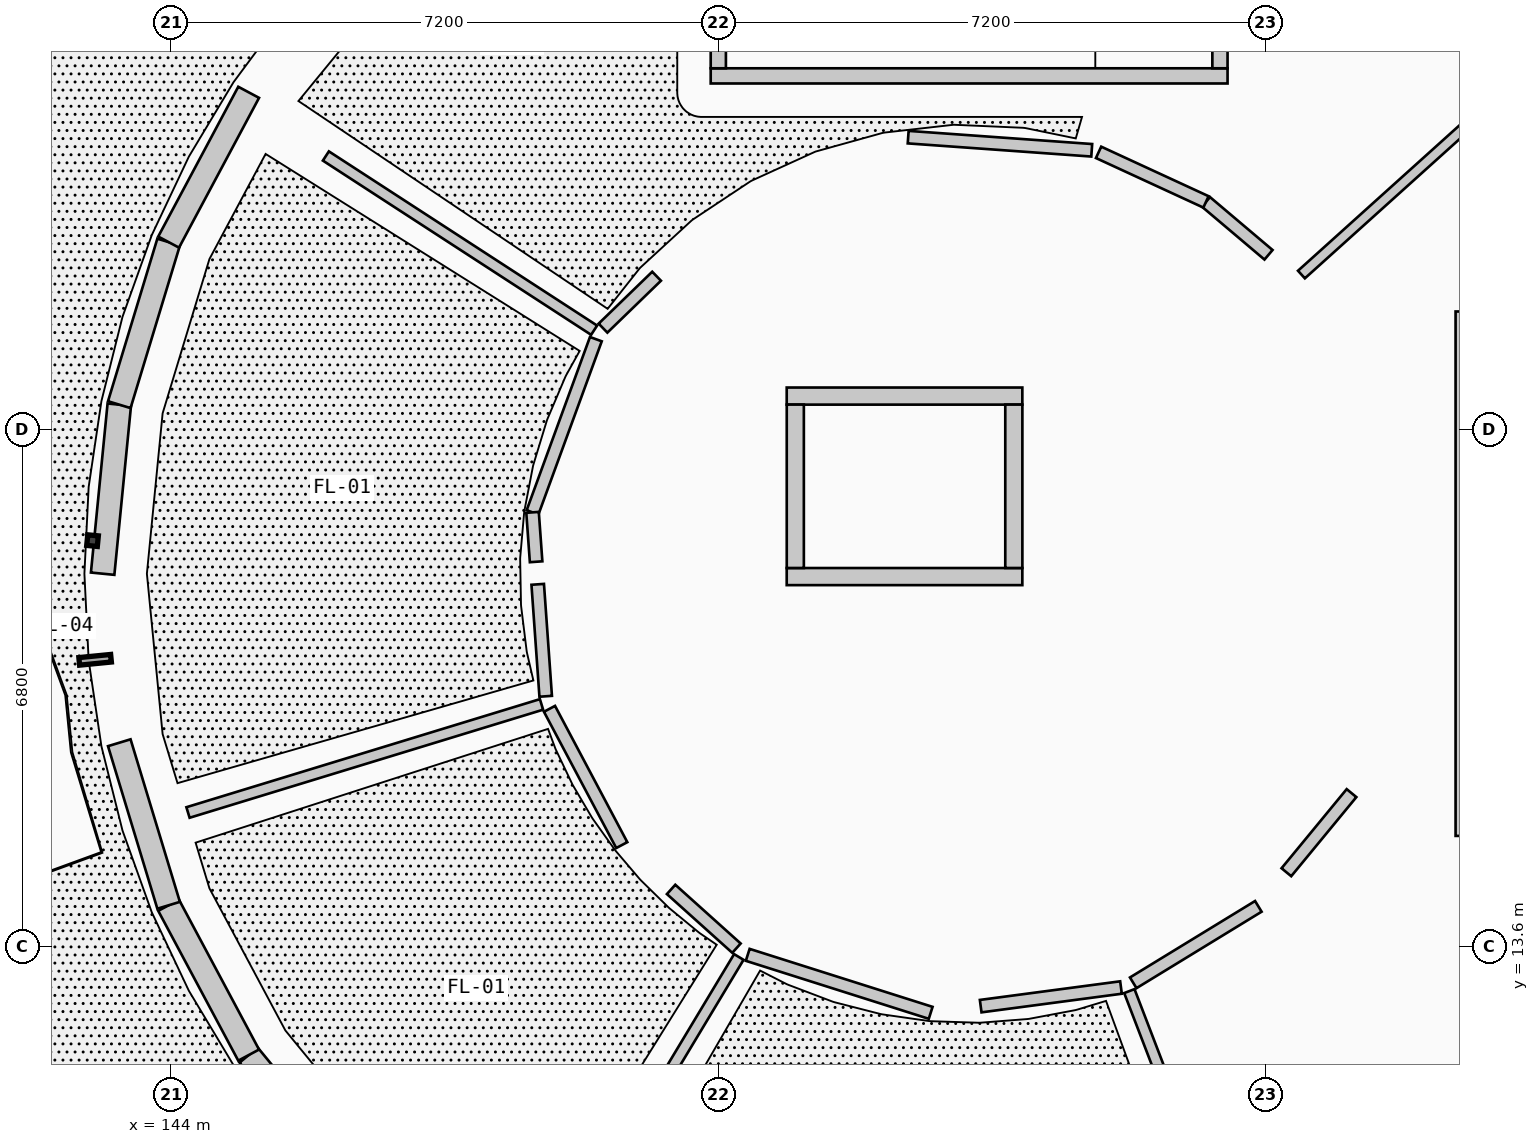
"""IFC4 building model, lengths in metres.
Left out: names, types, materials, properties, quantities, classifications, styles, units other than length and angle.
Written with IfcOpenShell. Run it as: python <this file> out.ifc"""

import sys

from ifc_helpers import new_model, si_unit, direction, frame, frame_2d, origin, origin_2d, place, context, subcontext, project, spatial, rectangle, circle, extrude, element, fill, save


model = new_model("IFC4")
c1 = context("Model", 3, precision=1e-05, world=origin(), true_north=direction((0.0, 1.0)))
c2 = subcontext(c1, "Body", "Model", "MODEL_VIEW")
j1 = project(units=[si_unit("LENGTHUNIT", "METRE"), si_unit("PLANEANGLEUNIT", "RADIAN")], contexts=[c1])
p1 = place(None, origin())
s1 = spatial("IfcSite", under=j1, at=p1, CompositionType="ELEMENT")
p2 = place(p1, origin())
s2 = spatial("IfcBuilding", under=s1, at=p2, CompositionType="ELEMENT")
p3 = place(p2, origin())
s3 = spatial("IfcBuildingStorey", under=s2, at=p3, CompositionType="ELEMENT", Elevation=0.0)
for number, where, z_axis, x_axis in (
    (1, (144.448, 22.664, 0.0), (0.0, 0.0, 1.0), (1.0, 0.0, 0.0)),
    (2, (143.62, 18.5, 0.0), (0.0, 0.0, 1.0), (1.0, 0.0, 0.0)),
    (3, (144.448, 14.336, 0.0), (0.0, 0.0, 1.0), (1.0, 0.0, 0.0)),
):
    element("IfcColumn", number, at=place(p3, frame(where, z_axis=z_axis, x_axis=x_axis)), inside=s3, PredefinedType="PILASTER", context=c2, shape_type="SweptSolid", body=[
        extrude(circle(Radius=0.275, at=origin_2d()), origin(), (0.0, 0.0, 1.0), 4.55),
    ])
for number, where, z_axis, x_axis in (
    (4, (158.601, 22.601, 0.0), (0.0, 0.0, 1.0), (1.0, 0.0, 0.0)),
    (5, (150.399, 22.601, 0.0), (0.0, 0.0, 1.0), (1.0, 0.0, 0.0)),
    (6, (148.7, 18.5, 0.0), (0.0, 0.0, 1.0), (1.0, 0.0, 0.0)),
    (7, (150.399, 14.399, 0.0), (0.0, 0.0, 1.0), (1.0, 0.0, 0.0)),
    (8, (154.5, 12.7, 0.0), (0.0, 0.0, 1.0), (1.0, 0.0, 0.0)),
    (9, (158.601, 14.399, 0.0), (0.0, 0.0, 1.0), (1.0, 0.0, 0.0)),
):
    element("IfcColumn", number, at=place(p3, frame(where, z_axis=z_axis, x_axis=x_axis)), inside=s3, PredefinedType="COLUMN", context=c2, shape_type="SweptSolid", body=[
        extrude(rectangle(XDim=0.365, YDim=0.365, at=origin_2d()), origin(), (0.0, 0.0, 1.0), 4.55),
    ])
p4 = place(p3, frame((143.129, 15.068, 0.0), z_axis=(0.0, 0.0, 1.0), x_axis=(1.0, 0.0, 0.0)))
e10 = element("IfcColumn", 10, at=p4, inside=s3, PredefinedType="PILASTER", context=c2, shape_type="SweptSolid", body=[
    extrude(circle(Radius=0.275, at=origin_2d()), origin(), (0.0, 0.0, 1.0), 4.55),
])
for number, where, z_axis, x_axis in (
    (11, (146.439, 10.439, 0.0), (0.0, 0.0, 1.0), (-0.635, 0.773, 0.0)),
    (12, (145.021, 12.166, 0.0), (0.0, 0.0, 1.0), (-0.471, 0.882, 0.0)),
):
    element("IfcWall", number, at=place(p3, frame(where, z_axis=z_axis, x_axis=x_axis)), inside=s3, PredefinedType="SOLIDWALL", context=c2, shape_type="SweptSolid", body=[
        extrude(rectangle(XDim=2.235, YDim=0.31, at=frame_2d((1.117, 0.0))), origin(), (0.0, 0.0, 1.0), 3.659),
    ])
p5 = place(p3, frame((143.968, 14.137, 0.0), z_axis=(0.0, 0.0, 1.0), x_axis=(-0.290322655883, 0.956928814218, 0.0)))
e13 = element("IfcWall", 13, at=p5, inside=s3, PredefinedType="SOLIDWALL", context=c2, shape_type="SweptSolid", body=[
    extrude(rectangle(XDim=2.235, YDim=0.31, at=frame_2d((1.118, 0.0))), origin(), (0.0, 0.0, 1.0), 3.659),
])
p6 = place(p3, frame((143.1, 18.5, 0.0), z_axis=(0.0, 0.0, 1.0), x_axis=(0.097989369151, 0.995187461503, 0.0)))
e14 = element("IfcWall", 14, at=p6, inside=s3, PredefinedType="SOLIDWALL", context=c2, shape_type="SweptSolid", body=[
    extrude(rectangle(XDim=2.235, YDim=0.31, at=frame_2d((1.117, 0.0))), origin(), (0.0, 0.0, 1.0), 3.659),
])
p7 = place(p3, frame((143.319, 20.724, 0.0), z_axis=(0.0, 0.0, 1.0), x_axis=(0.290322655883, 0.956928814218, 0.0)))
e15 = element("IfcWall", 15, at=p7, inside=s3, PredefinedType="SOLIDWALL", context=c2, shape_type="SweptSolid", body=[
    extrude(rectangle(XDim=2.235, YDim=0.31, at=frame_2d((1.118, 0.0))), origin(), (0.0, 0.0, 1.0), 3.659),
])
p8 = place(p3, frame((143.968, 22.863, 0.0), z_axis=(0.0, 0.0, 1.0), x_axis=(0.471217561446, 0.882017012185, 0.0)))
e16 = element("IfcWall", 16, at=p8, inside=s3, PredefinedType="SOLIDWALL", context=c2, shape_type="SweptSolid", body=[
    extrude(rectangle(XDim=2.235, YDim=0.31, at=frame_2d((1.117, 0.0))), origin(), (0.0, 0.0, 1.0), 3.659),
])
p9 = place(p8, frame((0.417, 0.0, 0.0)))
e17 = element("IfcOpeningElement", 17, at=p9, cuts=e16, PredefinedType="OPENING", context=c2, shape_type="SweptSolid", body=[
    extrude(rectangle(XDim=1.4, YDim=2.3, at=frame_2d((0.7, 1.15))), frame((0.0, 0.165, 0.0), z_axis=(0.0, -1.0, 0.0), x_axis=(1.0, 0.0, 0.0)), (0.0, 0.0, 1.0), 0.33),
])
p10 = place(p3, frame((161.025, 21.95, 0.0), z_axis=(0.0, 0.0, 1.0), x_axis=(0.0, -1.0, 0.0)))
e18 = element("IfcWall", 18, at=p10, inside=s3, PredefinedType="SHEAR", context=c2, shape_type="SweptSolid", body=[
    extrude(rectangle(XDim=6.9, YDim=0.25, at=frame_2d((3.45, 0.0))), origin(), (0.0, 0.0, 1.0), 4.305),
])
p11 = place(p10, frame((0.43, 0.0, 0.0)))
e19 = element("IfcOpeningElement", 19, at=p11, cuts=e18, PredefinedType="OPENING", context=c2, shape_type="SweptSolid", body=[
    extrude(rectangle(XDim=1.1, YDim=2.15, at=frame_2d((0.55, 1.075))), frame((0.0, 0.135, 0.0), z_axis=(0.0, -1.0, 0.0), x_axis=(1.0, 0.0, 0.0)), (0.0, 0.0, 1.0), 0.27),
])
p12 = place(p3, frame((151.1, 25.05, 0.0), z_axis=(0.0, 0.0, 1.0), x_axis=(1.0, 0.0, 0.0)))
e20 = element("IfcWall", 20, at=p12, inside=s3, PredefinedType="SHEAR", context=c2, shape_type="SweptSolid", body=[
    extrude(rectangle(XDim=6.8, YDim=0.2, at=frame_2d((3.4, 0.0))), origin(), (0.0, 0.0, 1.0), 4.305),
])
p13 = place(p12, frame((0.38, 0.0, 0.0)))
e21 = element("IfcOpeningElement", 21, at=p13, cuts=e20, PredefinedType="OPENING", context=c2, shape_type="SweptSolid", body=[
    extrude(rectangle(XDim=1.05, YDim=2.15, at=frame_2d((0.525, 1.075))), frame((0.0, 0.11, 0.0), z_axis=(0.0, -1.0, 0.0), x_axis=(1.0, 0.0, 0.0)), (0.0, 0.0, 1.0), 0.22),
])
for number, where, z_axis, x_axis in (
    (22, (151.2, 25.15, 0.0), (0.0, 0.0, 1.0), (0.0, 1.0, 0.0)),
    (23, (157.8, 25.15, 0.0), (0.0, 0.0, 1.0), (0.0, 1.0, 0.0)),
):
    element("IfcWall", number, at=place(p3, frame(where, z_axis=z_axis, x_axis=x_axis)), inside=s3, PredefinedType="SHEAR", context=c2, shape_type="SweptSolid", body=[
        extrude(rectangle(XDim=2.9, YDim=0.2, at=frame_2d((1.45, 0.0))), origin(), (0.0, 0.0, 1.0), 4.305),
    ])
p14 = place(p3, frame((152.1, 18.462, 0.0), z_axis=(0.0, 0.0, 1.0), x_axis=(1.0, 0.0, 0.0)))
e24 = element("IfcWall", 24, at=p14, inside=s3, PredefinedType="SHEAR", context=c2, shape_type="SweptSolid", body=[
    extrude(rectangle(XDim=3.1, YDim=0.225, at=frame_2d((1.55, 0.0))), origin(), (0.0, 0.0, 1.0), 4.305),
])
p15 = place(p14, frame((0.95, 0.0, 0.0)))
e25 = element("IfcOpeningElement", 25, at=p15, cuts=e24, PredefinedType="OPENING", context=c2, shape_type="SweptSolid", body=[
    extrude(rectangle(XDim=1.2, YDim=2.2, at=frame_2d((0.6, 1.1))), frame((0.0, 0.123, 0.0), z_axis=(0.0, -1.0, 0.0), x_axis=(1.0, 0.0, 0.0)), (0.0, 0.0, 1.0), 0.245),
])
p16 = place(p3, frame((152.1, 20.837, 0.0), z_axis=(0.0, 0.0, 1.0), x_axis=(1.0, 0.0, 0.0)))
e26 = element("IfcWall", 26, at=p16, inside=s3, PredefinedType="SHEAR", context=c2, shape_type="SweptSolid", body=[
    extrude(rectangle(XDim=3.1, YDim=0.225, at=frame_2d((1.55, 0.0))), origin(), (0.0, 0.0, 1.0), 4.305),
])
for number, where, z_axis, x_axis in (
    (27, (152.213, 18.575, 0.0), (0.0, 0.0, 1.0), (0.0, 1.0, 0.0)),
    (28, (155.088, 18.575, 0.0), (0.0, 0.0, 1.0), (0.0, 1.0, 0.0)),
):
    element("IfcWall", number, at=place(p3, frame(where, z_axis=z_axis, x_axis=x_axis)), inside=s3, PredefinedType="SHEAR", context=c2, shape_type="SweptSolid", body=[
        extrude(rectangle(XDim=2.15, YDim=0.225, at=frame_2d((1.075, 0.0))), origin(), (0.0, 0.0, 1.0), 4.305),
    ])
p17 = place(p3, frame((149.566, 21.704, 0.0), z_axis=(0.0, 0.0, 1.0), x_axis=(-0.838631802298, 0.544698724227, 0.0)))
e29 = element("IfcWall", 29, at=p17, inside=s3, PredefinedType="PARTITIONING", context=c2, shape_type="SweptSolid", body=[
    extrude(rectangle(XDim=4.208, YDim=0.145, at=frame_2d((2.104, 0.0))), origin(), (0.0, 0.0, 1.0), 3.634),
])
p18 = place(p3, frame((148.874, 16.78, 0.0), z_axis=(0.0, 0.0, 1.0), x_axis=(-0.956297390361, -0.292395795436, 0.0)))
e30 = element("IfcWall", 30, at=p18, inside=s3, PredefinedType="PARTITIONING", context=c2, shape_type="SweptSolid", body=[
    extrude(rectangle(XDim=4.864, YDim=0.145, at=frame_2d((2.432, 0.0))), origin(), (0.0, 0.0, 1.0), 3.634),
])
p19 = place(p3, frame((151.47, 13.457, 0.0), z_axis=(0.0, 0.0, 1.0), x_axis=(-0.515033199945, -0.857170229858, 0.0)))
e31 = element("IfcWall", 31, at=p19, inside=s3, PredefinedType="PARTITIONING", context=c2, shape_type="SweptSolid", body=[
    extrude(rectangle(XDim=4.007, YDim=0.145, at=frame_2d((2.004, 0.0))), origin(), (0.0, 0.0, 1.0), 3.634),
])
p20 = place(p3, frame((156.608, 13.008, 0.0), z_axis=(0.0, 0.0, 1.0), x_axis=(0.358370363431, -0.93357949989, 0.0)))
e32 = element("IfcWall", 32, at=p20, inside=s3, PredefinedType="PARTITIONING", context=c2, shape_type="SweptSolid", body=[
    extrude(rectangle(XDim=4.892, YDim=0.145, at=frame_2d((2.446, 0.0))), origin(), (0.0, 0.0, 1.0), 3.634),
])
p21 = place(p3, frame((158.872, 22.436, 0.0), z_axis=(0.0, 0.0, 1.0), x_axis=(0.743070024966, 0.669213671406, 0.0)))
e33 = element("IfcWall", 33, at=p21, inside=s3, PredefinedType="PLUMBINGWALL", context=c2, shape_type="SweptSolid", body=[
    extrude(rectangle(XDim=4.876, YDim=0.135, at=frame_2d((2.438, 0.0))), origin(), (0.0, 0.0, 1.0), 3.634),
])
p22 = place(p3, frame((156.113, 24.071, 0.0), z_axis=(0.0, 0.0, 1.0), x_axis=(-0.997448452595, 0.071390366401, 0.0)))
e34 = element("IfcWall", 34, at=p22, inside=s3, PredefinedType="PARTITIONING", context=c2, shape_type="SweptSolid", body=[
    extrude(rectangle(XDim=2.421, YDim=0.165, at=frame_2d((1.21, 0.0))), origin(), (0.0, 0.0, 1.0), 3.634),
])
p23 = place(p3, frame((150.388, 22.414, 0.0), z_axis=(0.0, 0.0, 1.0), x_axis=(-0.718088711181, -0.69595158084, 0.0)))
e35 = element("IfcWall", 35, at=p23, inside=s3, PredefinedType="PARTITIONING", context=c2, shape_type="SweptSolid", body=[
    extrude(rectangle(XDim=0.981, YDim=0.165, at=frame_2d((0.491, 0.0))), origin(), (0.0, 0.0, 1.0), 3.634),
])
p24 = place(p3, frame((149.589, 21.586, 0.0), z_axis=(0.0, 0.0, 1.0), x_axis=(-0.343293663048, -0.93922811974, 0.0)))
e36 = element("IfcWall", 36, at=p24, inside=s3, PredefinedType="PARTITIONING", context=c2, shape_type="SweptSolid", body=[
    extrude(rectangle(XDim=2.427, YDim=0.165, at=frame_2d((1.213, 0.0))), origin(), (0.0, 0.0, 1.0), 3.634),
])
p25 = place(p24, frame((0.703, 0.0, 0.0)))
e37 = element("IfcOpeningElement", 37, at=p25, cuts=e36, PredefinedType="OPENING", context=c2, shape_type="SweptSolid", body=[
    extrude(rectangle(XDim=1.02, YDim=2.2, at=frame_2d((0.51, 1.1))), frame((0.0, 0.093, 0.0), z_axis=(0.0, -1.0, 0.0), x_axis=(1.0, 0.0, 0.0)), (0.0, 0.0, 1.0), 0.185),
])
p26 = place(p3, frame((148.756, 19.307, 0.0), z_axis=(0.0, 0.0, 1.0), x_axis=(0.071939342489, -0.997409008884, 0.0)))
e38 = element("IfcWall", 38, at=p26, inside=s3, PredefinedType="PARTITIONING", context=c2, shape_type="SweptSolid", body=[
    extrude(rectangle(XDim=0.652, YDim=0.165, at=frame_2d((0.326, 0.0))), origin(), (0.0, 0.0, 1.0), 3.634),
])
p27 = place(p3, frame((148.824, 18.36, 0.0), z_axis=(0.0, 0.0, 1.0), x_axis=(0.071082579823, -0.997470434071, 0.0)))
e39 = element("IfcWall", 39, at=p27, inside=s3, PredefinedType="PARTITIONING", context=c2, shape_type="SweptSolid", body=[
    extrude(rectangle(XDim=1.477, YDim=0.165, at=frame_2d((0.738, 0.0))), origin(), (0.0, 0.0, 1.0), 3.634),
])
p28 = place(p3, frame((148.979, 16.722, 0.0), z_axis=(0.0, 0.0, 1.0), x_axis=(0.468545306674, -0.883439469117, 0.0)))
e40 = element("IfcWall", 40, at=p28, inside=s3, PredefinedType="PARTITIONING", context=c2, shape_type="SweptSolid", body=[
    extrude(rectangle(XDim=2.03, YDim=0.165, at=frame_2d((1.015, 0.0))), origin(), (0.0, 0.0, 1.0), 3.634),
])
p29 = place(p28, frame((0.505, 0.0, 0.0)))
e41 = element("IfcOpeningElement", 41, at=p29, cuts=e40, PredefinedType="OPENING", context=c2, shape_type="SweptSolid", body=[
    extrude(rectangle(XDim=1.02, YDim=2.2, at=frame_2d((0.51, 1.1))), frame((0.0, 0.093, 0.0), z_axis=(0.0, -1.0, 0.0), x_axis=(1.0, 0.0, 0.0)), (0.0, 0.0, 1.0), 0.185),
])
p30 = place(p3, frame((150.579, 14.346, 0.0), z_axis=(0.0, 0.0, 1.0), x_axis=(0.743692994732, -0.668521300773, 0.0)))
e42 = element("IfcWall", 42, at=p30, inside=s3, PredefinedType="PARTITIONING", context=c2, shape_type="SweptSolid", body=[
    extrude(rectangle(XDim=1.156, YDim=0.165, at=frame_2d((0.578, 0.0))), origin(), (0.0, 0.0, 1.0), 3.634),
])
p31 = place(p3, frame((151.587, 13.485, 0.0), z_axis=(0.0, 0.0, 1.0), x_axis=(0.953231317115, -0.302241717953, 0.0)))
e43 = element("IfcWall", 43, at=p31, inside=s3, PredefinedType="PARTITIONING", context=c2, shape_type="SweptSolid", body=[
    extrude(rectangle(XDim=2.525, YDim=0.165, at=frame_2d((1.263, 0.0))), origin(), (0.0, 0.0, 1.0), 3.634),
])
p32 = place(p31, frame((0.708, 0.0, 0.0)))
e44 = element("IfcOpeningElement", 44, at=p32, cuts=e43, PredefinedType="OPENING", context=c2, shape_type="SweptSolid", body=[
    extrude(rectangle(XDim=1.11, YDim=2.25, at=frame_2d((0.555, 1.125))), frame((0.0, 0.093, 0.0), z_axis=(0.0, -1.0, 0.0), x_axis=(1.0, 0.0, 0.0)), (0.0, 0.0, 1.0), 0.185),
])
p33 = place(p3, frame((154.652, 12.81, 0.0), z_axis=(0.0, 0.0, 1.0), x_axis=(0.991315849542, 0.13150241993, 0.0)))
e45 = element("IfcWall", 45, at=p33, inside=s3, PredefinedType="PARTITIONING", context=c2, shape_type="SweptSolid", body=[
    extrude(rectangle(XDim=1.862, YDim=0.165, at=frame_2d((0.931, 0.0))), origin(), (0.0, 0.0, 1.0), 3.634),
])
p34 = place(p3, frame((156.659, 13.117, 0.0), z_axis=(0.0, 0.0, 1.0), x_axis=(0.853231776627, 0.521531912115, 0.0)))
e46 = element("IfcWall", 46, at=p34, inside=s3, PredefinedType="PARTITIONING", context=c2, shape_type="SweptSolid", body=[
    extrude(rectangle(XDim=1.929, YDim=0.165, at=frame_2d((0.965, 0.0))), origin(), (0.0, 0.0, 1.0), 3.634),
])
p35 = place(p34, frame((0.455, 0.0, 0.0)))
e47 = element("IfcOpeningElement", 47, at=p35, cuts=e46, PredefinedType="OPENING", context=c2, shape_type="SweptSolid", body=[
    extrude(rectangle(XDim=1.02, YDim=2.2, at=frame_2d((0.51, 1.1))), frame((0.0, 0.093, 0.0), z_axis=(0.0, -1.0, 0.0), x_axis=(1.0, 0.0, 0.0)), (0.0, 0.0, 1.0), 0.185),
])
p36 = place(p3, frame((158.674, 14.572, 0.0), z_axis=(0.0, 0.0, 1.0), x_axis=(0.635542225464, 0.772066110934, 0.0)))
e48 = element("IfcWall", 48, at=p36, inside=s3, PredefinedType="PARTITIONING", context=c2, shape_type="SweptSolid", body=[
    extrude(rectangle(XDim=1.348, YDim=0.165, at=frame_2d((0.674, 0.0))), origin(), (0.0, 0.0, 1.0), 3.634),
])
p37 = place(p3, frame((158.439, 22.696, 0.0), z_axis=(0.0, 0.0, 1.0), x_axis=(-0.763540910225, 0.645759458633, 0.0)))
e49 = element("IfcWall", 49, at=p37, inside=s3, PredefinedType="PARTITIONING", context=c2, shape_type="SweptSolid", body=[
    extrude(rectangle(XDim=1.078, YDim=0.165, at=frame_2d((0.539, 0.0))), origin(), (0.0, 0.0, 1.0), 3.634),
])
p38 = place(p3, frame((157.616, 23.392, 0.0), z_axis=(0.0, 0.0, 1.0), x_axis=(-0.908042017689, 0.418879092472, 0.0)))
e50 = element("IfcWall", 50, at=p38, inside=s3, PredefinedType="PARTITIONING", context=c2, shape_type="SweptSolid", body=[
    extrude(rectangle(XDim=1.556, YDim=0.165, at=frame_2d((0.778, 0.0))), origin(), (0.0, 0.0, 1.0), 3.634),
])
p39 = place(p38, frame((0.328, 0.0, 0.0)))
e51 = element("IfcOpeningElement", 51, at=p39, cuts=e50, PredefinedType="OPENING", context=c2, shape_type="SweptSolid", body=[
    extrude(rectangle(XDim=0.9, YDim=2.1, at=frame_2d((0.45, 1.05))), frame((0.0, 0.093, 0.0), z_axis=(0.0, -1.0, 0.0), x_axis=(1.0, 0.0, 0.0)), (0.0, 0.0, 1.0), 0.185),
])
p40 = place(p9, origin())
e52 = element("IfcDoor", 52, at=p40, inside=s3, OperationType="SINGLE_SWING_LEFT", PredefinedType="DOOR", context=c2, shape_type="SweptSolid", body=[
    extrude(rectangle(XDim=1.4, YDim=2.3, at=frame_2d((0.7, 1.15))), frame((0.0, 0.025, 0.0), z_axis=(0.0, -1.0, 0.0), x_axis=(1.0, 0.0, 0.0)), (0.0, 0.0, 1.0), 0.05),
])
fill(e17, e52)
p41 = place(p13, origin())
e53 = element("IfcDoor", 53, at=p41, inside=s3, OperationType="SINGLE_SWING_RIGHT", PredefinedType="DOOR", context=c2, shape_type="SweptSolid", body=[
    extrude(rectangle(XDim=1.05, YDim=2.15, at=frame_2d((0.525, 1.075))), frame((0.0, 0.025, 0.0), z_axis=(0.0, -1.0, 0.0), x_axis=(1.0, 0.0, 0.0)), (0.0, 0.0, 1.0), 0.05),
])
fill(e21, e53)
p42 = place(p15, origin())
e54 = element("IfcDoor", 54, at=p42, inside=s3, OperationType="DOUBLE_DOOR_SLIDING", PredefinedType="DOOR", context=c2, shape_type="SweptSolid", body=[
    extrude(rectangle(XDim=1.2, YDim=2.2, at=frame_2d((0.6, 1.1))), frame((0.0, 0.025, 0.0), z_axis=(0.0, -1.0, 0.0), x_axis=(1.0, 0.0, 0.0)), (0.0, 0.0, 1.0), 0.05),
])
fill(e25, e54)
p43 = place(p25, origin())
e55 = element("IfcDoor", 55, at=p43, inside=s3, OperationType="SINGLE_SWING_LEFT", PredefinedType="DOOR", context=c2, shape_type="SweptSolid", body=[
    extrude(rectangle(XDim=1.02, YDim=2.2, at=frame_2d((0.51, 1.1))), frame((0.0, 0.025, 0.0), z_axis=(0.0, -1.0, 0.0), x_axis=(1.0, 0.0, 0.0)), (0.0, 0.0, 1.0), 0.05),
])
fill(e37, e55)
p44 = place(p29, origin())
e56 = element("IfcDoor", 56, at=p44, inside=s3, OperationType="SINGLE_SWING_RIGHT", PredefinedType="DOOR", context=c2, shape_type="SweptSolid", body=[
    extrude(rectangle(XDim=1.02, YDim=2.2, at=frame_2d((0.51, 1.1))), frame((0.0, 0.025, 0.0), z_axis=(0.0, -1.0, 0.0), x_axis=(1.0, 0.0, 0.0)), (0.0, 0.0, 1.0), 0.05),
])
fill(e41, e56)
p45 = place(p32, origin())
e57 = element("IfcDoor", 57, at=p45, inside=s3, OperationType="SINGLE_SWING_LEFT", PredefinedType="DOOR", context=c2, shape_type="SweptSolid", body=[
    extrude(rectangle(XDim=1.11, YDim=2.25, at=frame_2d((0.555, 1.125))), frame((0.0, 0.025, 0.0), z_axis=(0.0, -1.0, 0.0), x_axis=(1.0, 0.0, 0.0)), (0.0, 0.0, 1.0), 0.05),
])
fill(e44, e57)
p46 = place(p35, origin())
e58 = element("IfcDoor", 58, at=p46, inside=s3, OperationType="SINGLE_SWING_RIGHT", PredefinedType="DOOR", context=c2, shape_type="SweptSolid", body=[
    extrude(rectangle(XDim=1.02, YDim=2.2, at=frame_2d((0.51, 1.1))), frame((0.0, 0.025, 0.0), z_axis=(0.0, -1.0, 0.0), x_axis=(1.0, 0.0, 0.0)), (0.0, 0.0, 1.0), 0.05),
])
fill(e47, e58)
p47 = place(p39, origin())
e59 = element("IfcDoor", 59, at=p47, inside=s3, OperationType="SINGLE_SWING_LEFT", PredefinedType="DOOR", context=c2, shape_type="SweptSolid", body=[
    extrude(rectangle(XDim=0.9, YDim=2.1, at=frame_2d((0.45, 1.05))), frame((0.0, 0.025, 0.0), z_axis=(0.0, -1.0, 0.0), x_axis=(1.0, 0.0, 0.0)), (0.0, 0.0, 1.0), 0.05),
])
fill(e51, e59)
save(model, sys.argv[1])
